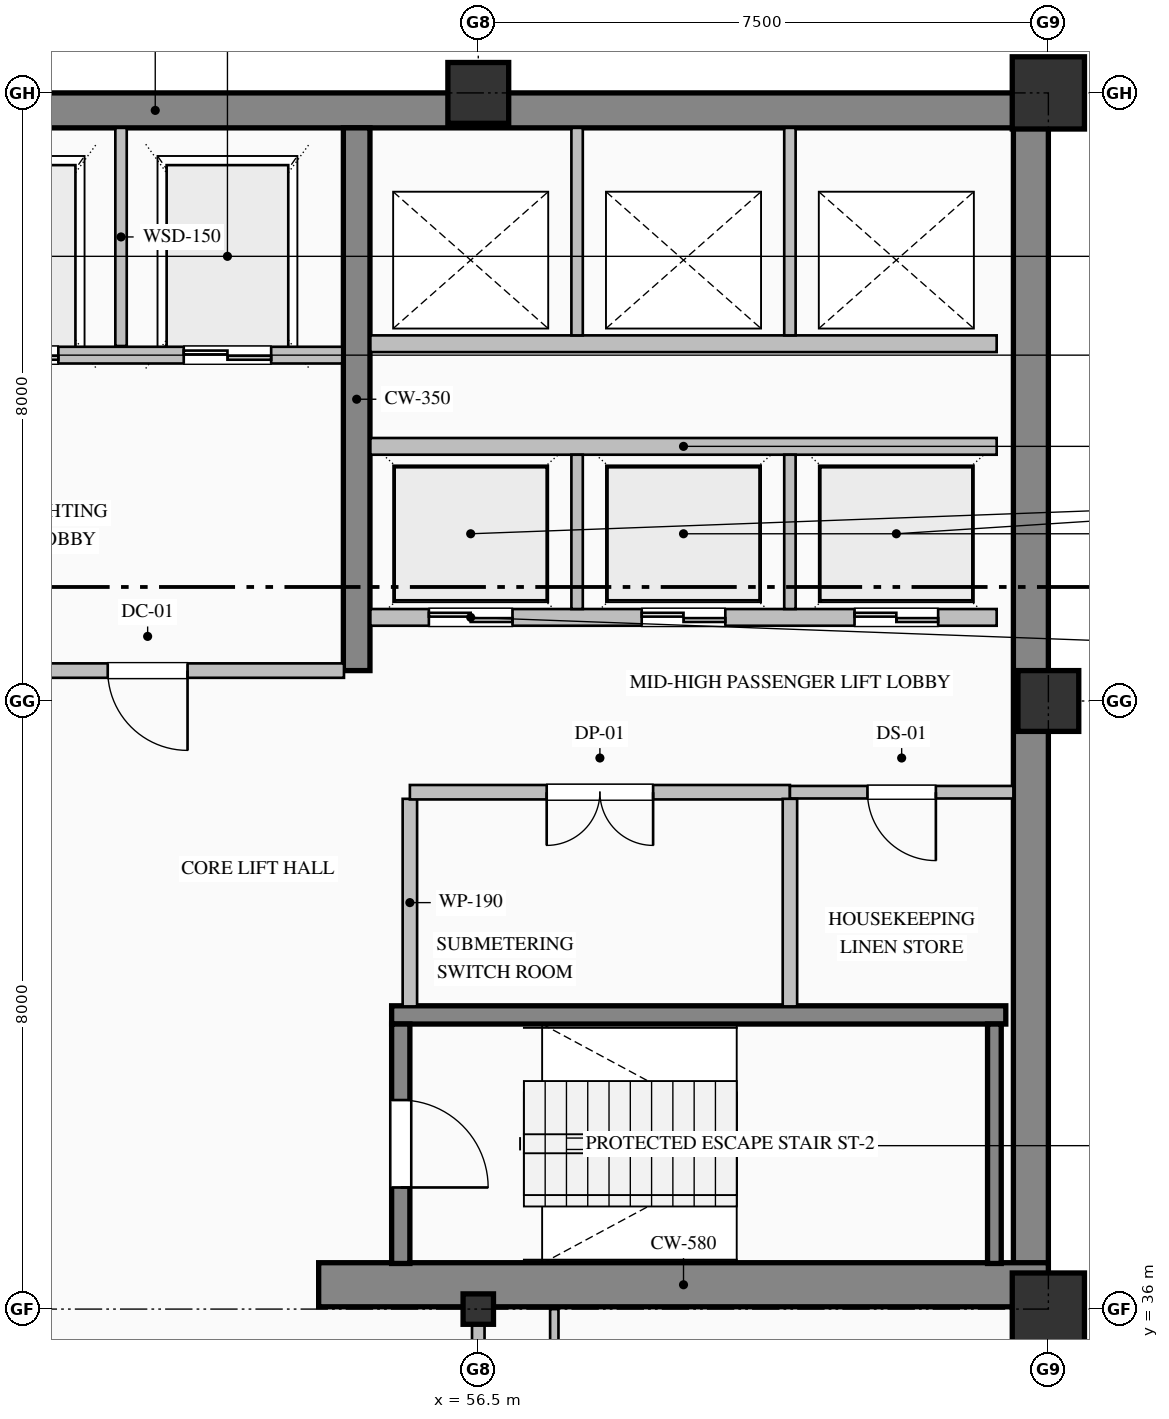
"""IFC4 building model, lengths in metres.
Left out: names, types, materials, properties, quantities, classifications, styles, units other than length and angle.
Written with IfcOpenShell. Run it as: python <this file> out.ifc"""

import sys

from ifc_helpers import new_model, si_unit, direction, frame, frame_2d, origin, origin_2d, place, context, subcontext, project, spatial, rectangle, hollow_rectangle, i_section, extrude, element, fill, save


model = new_model("IFC4")
c1 = context("Model", 3, precision=1e-05, world=origin(), true_north=direction((0.0, 1.0)))
c2 = subcontext(c1, "Body", "Model", "MODEL_VIEW")
j1 = project(units=[si_unit("LENGTHUNIT", "METRE"), si_unit("PLANEANGLEUNIT", "RADIAN")], contexts=[c1])
p1 = place(None, origin())
s1 = spatial("IfcSite", under=j1, at=p1, CompositionType="ELEMENT")
p2 = place(p1, origin())
s2 = spatial("IfcBuilding", under=s1, at=p2, CompositionType="ELEMENT")
p3 = place(p2, frame((0.0, 0.0, 245.8)))
s3 = spatial("IfcBuildingStorey", under=s2, at=p3, CompositionType="ELEMENT", Elevation=245.8)
p4 = place(p3, frame((40.5, 51.77, 0.0), z_axis=(0.0, 0.0, 1.0), x_axis=(1.0, 0.0, 0.0)))
e1 = element("IfcWall", 1, at=p4, inside=s3, PredefinedType="SHEAR", context=c2, shape_type="SweptSolid", body=[
    extrude(rectangle(XDim=23.5, YDim=0.46, at=frame_2d((11.75, 0.0))), origin(), (0.0, 0.0, 1.0), 3.775),
])
p5 = place(p3, frame((63.77, 36.32, 0.0), z_axis=(0.0, 0.0, 1.0), x_axis=(0.0, 1.0, 0.0)))
e2 = element("IfcWall", 2, at=p5, inside=s3, PredefinedType="SHEAR", context=c2, shape_type="SweptSolid", body=[
    extrude(rectangle(XDim=15.22, YDim=0.46, at=frame_2d((7.61, 0.0))), origin(), (0.0, 0.0, 1.0), 3.775),
])
p6 = place(p3, frame((54.4, 36.32, 0.0), z_axis=(0.0, 0.0, 1.0), x_axis=(1.0, 0.0, 0.0)))
e3 = element("IfcWall", 3, at=p6, inside=s3, PredefinedType="SHEAR", context=c2, shape_type="SweptSolid", body=[
    extrude(rectangle(XDim=9.6, YDim=0.58, at=frame_2d((4.8, 0.0))), origin(), (0.0, 0.0, 1.0), 4.0),
])
p7 = place(p3, frame((54.9, 44.4, 0.0), z_axis=(0.0, 0.0, 1.0), x_axis=(0.0, 1.0, 0.0)))
e4 = element("IfcWall", 4, at=p7, inside=s3, PredefinedType="SHEAR", context=c2, shape_type="SweptSolid", body=[
    extrude(rectangle(XDim=7.14, YDim=0.35, at=frame_2d((3.57, 0.0))), origin(), (0.0, 0.0, 1.0), 3.775),
])
p8 = place(p3, frame((56.5, 36.0, 0.0), z_axis=(0.0, 0.0, 1.0), x_axis=(1.0, 0.0, 0.0)))
e5 = element("IfcColumn", 5, at=p8, inside=s3, PredefinedType="COLUMN", context=c2, shape_type="SweptSolid", body=[
    extrude(i_section(OverallWidth=0.4, OverallDepth=0.4, WebThickness=0.013, FlangeThickness=0.021, FilletRadius=0.022, at=origin_2d()), origin(), (0.0, 0.0, 1.0), 4.0),
])
p9 = place(p3, frame((56.5, 52.0, 0.0), z_axis=(0.0, 0.0, 1.0), x_axis=(1.0, 0.0, 0.0)))
e6 = element("IfcColumn", 6, at=p9, inside=s3, PredefinedType="COLUMN", context=c2, shape_type="SweptSolid", body=[
    extrude(hollow_rectangle(XDim=0.8, YDim=0.8, WallThickness=0.032, at=origin_2d()), origin(), (0.0, 0.0, 1.0), 4.0),
])
p10 = place(p3, frame((64.0, 36.0, 0.0), z_axis=(0.0, 0.0, 1.0), x_axis=(1.0, 0.0, 0.0)))
e7 = element("IfcColumn", 7, at=p10, inside=s3, PredefinedType="COLUMN", context=c2, shape_type="SweptSolid", body=[
    extrude(hollow_rectangle(XDim=0.95, YDim=0.95, WallThickness=0.036, at=origin_2d()), origin(), (0.0, 0.0, 1.0), 4.0),
])
p11 = place(p3, frame((64.0, 44.0, 0.0), z_axis=(0.0, 0.0, 1.0), x_axis=(1.0, 0.0, 0.0)))
e8 = element("IfcColumn", 8, at=p11, inside=s3, PredefinedType="COLUMN", context=c2, shape_type="SweptSolid", body=[
    extrude(hollow_rectangle(XDim=0.8, YDim=0.8, WallThickness=0.032, at=origin_2d()), origin(), (0.0, 0.0, 1.0), 4.0),
])
p12 = place(p3, frame((64.0, 52.0, 0.0), z_axis=(0.0, 0.0, 1.0), x_axis=(1.0, 0.0, 0.0)))
e9 = element("IfcColumn", 9, at=p12, inside=s3, PredefinedType="COLUMN", context=c2, shape_type="SweptSolid", body=[
    extrude(hollow_rectangle(XDim=0.95, YDim=0.95, WallThickness=0.036, at=origin_2d()), origin(), (0.0, 0.0, 1.0), 4.0),
])
p13 = place(p3, frame((63.82, 36.05, 0.0), z_axis=(0.0, 0.0, 1.0), x_axis=(0.0, -1.0, 0.0)))
e10 = element("IfcWall", 10, at=p13, inside=s3, PredefinedType="SOLIDWALL", context=c2, shape_type="SweptSolid", body=[
    extrude(rectangle(XDim=19.55, YDim=0.36, at=frame_2d((9.775, 0.0))), origin(), (0.0, 0.0, 1.0), 3.325),
])
p14 = place(p13, frame((2.85, 0.0, 0.7)))
e11 = element("IfcOpeningElement", 11, at=p14, cuts=e10, PredefinedType="OPENING", context=c2, shape_type="SweptSolid", body=[
    extrude(rectangle(XDim=1.5, YDim=2.4, at=frame_2d((0.75, 1.2))), frame((0.0, 0.19, 0.0), z_axis=(0.0, -1.0, 0.0), x_axis=(1.0, 0.0, 0.0)), (0.0, 0.0, 1.0), 0.38),
])
p15 = place(p13, frame((10.125, 0.0, 0.9)))
e12 = element("IfcOpeningElement", 12, at=p15, cuts=e10, PredefinedType="OPENING", context=c2, shape_type="SweptSolid", body=[
    extrude(rectangle(XDim=1.35, YDim=1.85, at=frame_2d((0.675, 0.925))), frame((0.0, 0.19, 0.0), z_axis=(0.0, -1.0, 0.0), x_axis=(1.0, 0.0, 0.0)), (0.0, 0.0, 1.0), 0.38),
])
p16 = place(p13, frame((13.65, 0.0, 0.7)))
e13 = element("IfcOpeningElement", 13, at=p16, cuts=e10, PredefinedType="OPENING", context=c2, shape_type="SweptSolid", body=[
    extrude(rectangle(XDim=1.5, YDim=2.4, at=frame_2d((0.75, 1.2))), frame((0.0, 0.19, 0.0), z_axis=(0.0, -1.0, 0.0), x_axis=(1.0, 0.0, 0.0)), (0.0, 0.0, 1.0), 0.38),
])
p17 = place(p3, frame((55.36, 39.87, 0.0), z_axis=(0.0, 0.0, 1.0), x_axis=(1.0, 0.0, 0.0)))
e14 = element("IfcWall", 14, at=p17, inside=s3, PredefinedType="SOLIDWALL", context=c2, shape_type="SweptSolid", body=[
    extrude(rectangle(XDim=8.08, YDim=0.24, at=frame_2d((4.04, 0.0))), origin(), (0.0, 0.0, 1.0), 4.0),
])
p18 = place(p3, frame((55.48, 39.75, 0.0), z_axis=(0.0, 0.0, 1.0), x_axis=(0.0, -1.0, 0.0)))
e15 = element("IfcWall", 15, at=p18, inside=s3, PredefinedType="SOLIDWALL", context=c2, shape_type="SweptSolid", body=[
    extrude(rectangle(XDim=3.15, YDim=0.24, at=frame_2d((1.575, 0.0))), origin(), (0.0, 0.0, 1.0), 4.0),
])
p19 = place(p18, frame((1.0, 0.0, 0.0)))
e16 = element("IfcOpeningElement", 16, at=p19, cuts=e15, PredefinedType="OPENING", context=c2, shape_type="SweptSolid", body=[
    extrude(rectangle(XDim=1.15, YDim=2.2, at=frame_2d((0.575, 1.1))), frame((0.0, 0.13, 0.0), z_axis=(0.0, -1.0, 0.0), x_axis=(1.0, 0.0, 0.0)), (0.0, 0.0, 1.0), 0.26),
])
p20 = place(p3, frame((63.29, 36.6, 0.0), z_axis=(0.0, 0.0, 1.0), x_axis=(0.0, 1.0, 0.0)))
e17 = element("IfcWall", 17, at=p20, inside=s3, PredefinedType="SOLIDWALL", context=c2, shape_type="SweptSolid", body=[
    extrude(rectangle(XDim=3.15, YDim=0.18, at=frame_2d((1.575, 0.0))), origin(), (0.0, 0.0, 1.0), 4.0),
])
p21 = place(p3, frame((54.71, 48.55, 0.0), z_axis=(0.0, 0.0, 1.0), x_axis=(-1.0, 0.0, 0.0)))
e18 = element("IfcWall", 18, at=p21, inside=s3, PredefinedType="PARTITIONING", context=c2, shape_type="SweptSolid", body=[
    extrude(rectangle(XDim=5.12, YDim=0.22, at=frame_2d((2.56, 0.0))), origin(), (0.0, 0.0, 1.0), 3.775),
])
p22 = place(p21, frame((3.735, 0.0, 0.0)))
e19 = element("IfcOpeningElement", 19, at=p22, cuts=e18, PredefinedType="OPENING", context=c2, shape_type="SweptSolid", body=[
    extrude(rectangle(XDim=1.15, YDim=2.2, at=frame_2d((0.575, 1.1))), frame((0.0, 0.12, 0.0), z_axis=(0.0, -1.0, 0.0), x_axis=(1.0, 0.0, 0.0)), (0.0, 0.0, 1.0), 0.24),
])
p23 = place(p21, frame((0.935, 0.0, 0.0)))
e20 = element("IfcOpeningElement", 20, at=p23, cuts=e18, PredefinedType="OPENING", context=c2, shape_type="SweptSolid", body=[
    extrude(rectangle(XDim=1.15, YDim=2.2, at=frame_2d((0.575, 1.1))), frame((0.0, 0.12, 0.0), z_axis=(0.0, -1.0, 0.0), x_axis=(1.0, 0.0, 0.0)), (0.0, 0.0, 1.0), 0.24),
])
p24 = place(p3, frame((51.8, 48.67, 0.0), z_axis=(0.0, 0.0, 1.0), x_axis=(0.0, 1.0, 0.0)))
e21 = element("IfcWall", 21, at=p24, inside=s3, PredefinedType="PARTITIONING", context=c2, shape_type="SweptSolid", body=[
    extrude(rectangle(XDim=2.87, YDim=0.15, at=frame_2d((1.435, 0.0))), origin(), (0.0, 0.0, 1.0), 3.775),
])
p25 = place(p3, frame((63.32, 45.1, 0.0), z_axis=(0.0, 0.0, 1.0), x_axis=(-1.0, 0.0, 0.0)))
e22 = element("IfcWall", 22, at=p25, inside=s3, PredefinedType="PARTITIONING", context=c2, shape_type="SweptSolid", body=[
    extrude(rectangle(XDim=8.24, YDim=0.22, at=frame_2d((4.12, 0.0))), origin(), (0.0, 0.0, 1.0), 3.775),
])
p26 = place(p25, frame((6.37, 0.0, 0.0)))
e23 = element("IfcOpeningElement", 23, at=p26, cuts=e22, PredefinedType="OPENING", context=c2, shape_type="SweptSolid", body=[
    extrude(rectangle(XDim=1.1, YDim=2.2, at=frame_2d((0.55, 1.1))), frame((0.0, 0.12, 0.0), z_axis=(0.0, -1.0, 0.0), x_axis=(1.0, 0.0, 0.0)), (0.0, 0.0, 1.0), 0.24),
])
p27 = place(p25, frame((3.57, 0.0, 0.0)))
e24 = element("IfcOpeningElement", 24, at=p27, cuts=e22, PredefinedType="OPENING", context=c2, shape_type="SweptSolid", body=[
    extrude(rectangle(XDim=1.1, YDim=2.2, at=frame_2d((0.55, 1.1))), frame((0.0, 0.12, 0.0), z_axis=(0.0, -1.0, 0.0), x_axis=(1.0, 0.0, 0.0)), (0.0, 0.0, 1.0), 0.24),
])
p28 = place(p25, frame((0.77, 0.0, 0.0)))
e25 = element("IfcOpeningElement", 25, at=p28, cuts=e22, PredefinedType="OPENING", context=c2, shape_type="SweptSolid", body=[
    extrude(rectangle(XDim=1.1, YDim=2.2, at=frame_2d((0.55, 1.1))), frame((0.0, 0.12, 0.0), z_axis=(0.0, -1.0, 0.0), x_axis=(1.0, 0.0, 0.0)), (0.0, 0.0, 1.0), 0.24),
])
p29 = place(p3, frame((55.08, 47.35, 0.0), z_axis=(0.0, 0.0, 1.0), x_axis=(1.0, 0.0, 0.0)))
e26 = element("IfcWall", 26, at=p29, inside=s3, PredefinedType="PARTITIONING", context=c2, shape_type="SweptSolid", body=[
    extrude(rectangle(XDim=8.24, YDim=0.22, at=frame_2d((4.12, 0.0))), origin(), (0.0, 0.0, 1.0), 3.775),
])
for number, where, z_axis, x_axis in (
    (27, (57.8, 45.21, 0.0), (0.0, 0.0, 1.0), (0.0, 1.0, 0.0)),
    (28, (60.6, 45.21, 0.0), (0.0, 0.0, 1.0), (0.0, 1.0, 0.0)),
):
    element("IfcWall", number, at=place(p3, frame(where, z_axis=z_axis, x_axis=x_axis)), inside=s3, PredefinedType="PARTITIONING", context=c2, shape_type="SweptSolid", body=[
        extrude(rectangle(XDim=2.03, YDim=0.15, at=frame_2d((1.015, 0.0))), origin(), (0.0, 0.0, 1.0), 3.775),
    ])
p30 = place(p3, frame((63.32, 48.7, 0.0), z_axis=(0.0, 0.0, 1.0), x_axis=(-1.0, 0.0, 0.0)))
e29 = element("IfcWall", 29, at=p30, inside=s3, PredefinedType="PARTITIONING", context=c2, shape_type="SweptSolid", body=[
    extrude(rectangle(XDim=8.24, YDim=0.22, at=frame_2d((4.12, 0.0))), origin(), (0.0, 0.0, 1.0), 3.775),
])
for number, where, z_axis, x_axis in (
    (30, (57.8, 48.81, 0.0), (0.0, 0.0, 1.0), (0.0, 1.0, 0.0)),
    (31, (60.6, 48.81, 0.0), (0.0, 0.0, 1.0), (0.0, 1.0, 0.0)),
):
    element("IfcWall", number, at=place(p3, frame(where, z_axis=z_axis, x_axis=x_axis)), inside=s3, PredefinedType="PARTITIONING", context=c2, shape_type="SweptSolid", body=[
        extrude(rectangle(XDim=2.73, YDim=0.15, at=frame_2d((1.365, 0.0))), origin(), (0.0, 0.0, 1.0), 3.775),
    ])
p31 = place(p3, frame((54.733, 44.4, 0.0), z_axis=(0.0, 0.0, 1.0), x_axis=(-1.0, 0.0, 0.0)))
e32 = element("IfcWall", 32, at=p31, inside=s3, PredefinedType="PARTITIONING", context=c2, shape_type="SweptSolid", body=[
    extrude(rectangle(XDim=5.166, YDim=0.19, at=frame_2d((2.583, 0.0))), origin(), (0.0, 0.0, 1.0), 3.775),
])
p32 = place(p31, frame((2.058, 0.0, 0.0)))
e33 = element("IfcOpeningElement", 33, at=p32, cuts=e32, PredefinedType="OPENING", context=c2, shape_type="SweptSolid", body=[
    extrude(rectangle(XDim=1.05, YDim=2.15, at=frame_2d((0.525, 1.075))), frame((0.0, 0.105, 0.0), z_axis=(0.0, -1.0, 0.0), x_axis=(1.0, 0.0, 0.0)), (0.0, 0.0, 1.0), 0.21),
])
p33 = place(p3, frame((55.6, 42.713, 0.0), z_axis=(0.0, 0.0, 1.0), x_axis=(0.0, -1.0, 0.0)))
e34 = element("IfcWall", 34, at=p33, inside=s3, PredefinedType="PARTITIONING", context=c2, shape_type="SweptSolid", body=[
    extrude(rectangle(XDim=2.731, YDim=0.19, at=frame_2d((1.365, 0.0))), origin(), (0.0, 0.0, 1.0), 3.775),
])
p34 = place(p3, frame((60.6, 42.8, 0.0), z_axis=(0.0, 0.0, 1.0), x_axis=(-1.0, 0.0, 0.0)))
e35 = element("IfcWall", 35, at=p34, inside=s3, PredefinedType="PARTITIONING", context=c2, shape_type="SweptSolid", body=[
    extrude(rectangle(XDim=5.0, YDim=0.19, at=frame_2d((2.5, 0.0))), origin(), (0.0, 0.0, 1.0), 3.775),
])
p35 = place(p34, frame((1.8, 0.0, 0.0)))
e36 = element("IfcOpeningElement", 36, at=p35, cuts=e35, PredefinedType="OPENING", context=c2, shape_type="SweptSolid", body=[
    extrude(rectangle(XDim=1.4, YDim=2.25, at=frame_2d((0.7, 1.125))), frame((0.0, 0.105, 0.0), z_axis=(0.0, -1.0, 0.0), x_axis=(1.0, 0.0, 0.0)), (0.0, 0.0, 1.0), 0.21),
])
p36 = place(p3, frame((63.54, 42.8, 0.0), z_axis=(0.0, 0.0, 1.0), x_axis=(-1.0, 0.0, 0.0)))
e37 = element("IfcWall", 37, at=p36, inside=s3, PredefinedType="PARTITIONING", context=c2, shape_type="SweptSolid", body=[
    extrude(rectangle(XDim=2.94, YDim=0.165, at=frame_2d((1.47, 0.0))), origin(), (0.0, 0.0, 1.0), 3.775),
])
p37 = place(p36, frame((1.02, 0.0, 0.0)))
e38 = element("IfcOpeningElement", 38, at=p37, cuts=e37, PredefinedType="OPENING", context=c2, shape_type="SweptSolid", body=[
    extrude(rectangle(XDim=0.9, YDim=2.15, at=frame_2d((0.45, 1.075))), frame((0.0, 0.093, 0.0), z_axis=(0.0, -1.0, 0.0), x_axis=(1.0, 0.0, 0.0)), (0.0, 0.0, 1.0), 0.185),
])
p38 = place(p3, frame((60.6, 42.713, 0.0), z_axis=(0.0, 0.0, 1.0), x_axis=(0.0, -1.0, 0.0)))
e39 = element("IfcWall", 39, at=p38, inside=s3, PredefinedType="PARTITIONING", context=c2, shape_type="SweptSolid", body=[
    extrude(rectangle(XDim=2.731, YDim=0.19, at=frame_2d((1.365, 0.0))), origin(), (0.0, 0.0, 1.0), 3.775),
])
p39 = place(p3, frame((56.5, 36.0, 0.0), z_axis=(0.0, 0.0, 1.0), x_axis=(0.0, -1.0, 0.0)))
e40 = element("IfcWall", 40, at=p39, inside=s3, PredefinedType="PARTITIONING", context=c2, shape_type="SweptSolid", body=[
    extrude(rectangle(XDim=5.525, YDim=0.165, at=frame_2d((2.763, 0.0))), origin(), (0.0, 0.0, 1.0), 3.179),
])
p40 = place(p3, frame((57.5, 36.0, 0.0), z_axis=(0.0, 0.0, 1.0), x_axis=(0.0, -1.0, 0.0)))
e41 = element("IfcWall", 41, at=p40, inside=s3, PredefinedType="MOVABLE", context=c2, shape_type="SweptSolid", body=[
    extrude(rectangle(XDim=12.525, YDim=0.11, at=frame_2d((6.263, 0.0))), origin(), (0.0, 0.0, 1.0), 3.775),
])
p41 = place(p40, frame((5.763, 0.0, 0.0)))
e42 = element("IfcOpeningElement", 42, at=p41, cuts=e41, PredefinedType="OPENING", context=c2, shape_type="SweptSolid", body=[
    extrude(rectangle(XDim=1.0, YDim=2.15, at=frame_2d((0.5, 1.075))), frame((0.0, 0.065, 0.0), z_axis=(0.0, -1.0, 0.0), x_axis=(1.0, 0.0, 0.0)), (0.0, 0.0, 1.0), 0.13),
])
p42 = place(p19, origin())
e43 = element("IfcDoor", 43, at=p42, inside=s3, OperationType="SINGLE_SWING_RIGHT", PredefinedType="DOOR", context=c2, shape_type="SweptSolid", body=[
    extrude(rectangle(XDim=1.15, YDim=2.2, at=frame_2d((0.575, 1.1))), frame((0.0, 0.025, 0.0), z_axis=(0.0, -1.0, 0.0), x_axis=(1.0, 0.0, 0.0)), (0.0, 0.0, 1.0), 0.05),
])
fill(e16, e43)
p43 = place(p22, origin())
e44 = element("IfcDoor", 44, at=p43, inside=s3, OperationType="DOUBLE_DOOR_SLIDING", PredefinedType="DOOR", context=c2, shape_type="SweptSolid", body=[
    extrude(rectangle(XDim=1.15, YDim=2.2, at=frame_2d((0.575, 1.1))), frame((0.0, 0.025, 0.0), z_axis=(0.0, -1.0, 0.0), x_axis=(1.0, 0.0, 0.0)), (0.0, 0.0, 1.0), 0.05),
])
fill(e19, e44)
p44 = place(p23, origin())
e45 = element("IfcDoor", 45, at=p44, inside=s3, OperationType="DOUBLE_DOOR_SLIDING", PredefinedType="DOOR", context=c2, shape_type="SweptSolid", body=[
    extrude(rectangle(XDim=1.15, YDim=2.2, at=frame_2d((0.575, 1.1))), frame((0.0, 0.025, 0.0), z_axis=(0.0, -1.0, 0.0), x_axis=(1.0, 0.0, 0.0)), (0.0, 0.0, 1.0), 0.05),
])
fill(e20, e45)
p45 = place(p26, origin())
e46 = element("IfcDoor", 46, at=p45, inside=s3, OperationType="DOUBLE_DOOR_SLIDING", PredefinedType="DOOR", context=c2, shape_type="SweptSolid", body=[
    extrude(rectangle(XDim=1.1, YDim=2.2, at=frame_2d((0.55, 1.1))), frame((0.0, 0.025, 0.0), z_axis=(0.0, -1.0, 0.0), x_axis=(1.0, 0.0, 0.0)), (0.0, 0.0, 1.0), 0.05),
])
fill(e23, e46)
p46 = place(p27, origin())
e47 = element("IfcDoor", 47, at=p46, inside=s3, OperationType="DOUBLE_DOOR_SLIDING", PredefinedType="DOOR", context=c2, shape_type="SweptSolid", body=[
    extrude(rectangle(XDim=1.1, YDim=2.2, at=frame_2d((0.55, 1.1))), frame((0.0, 0.025, 0.0), z_axis=(0.0, -1.0, 0.0), x_axis=(1.0, 0.0, 0.0)), (0.0, 0.0, 1.0), 0.05),
])
fill(e24, e47)
p47 = place(p28, origin())
e48 = element("IfcDoor", 48, at=p47, inside=s3, OperationType="DOUBLE_DOOR_SLIDING", PredefinedType="DOOR", context=c2, shape_type="SweptSolid", body=[
    extrude(rectangle(XDim=1.1, YDim=2.2, at=frame_2d((0.55, 1.1))), frame((0.0, 0.025, 0.0), z_axis=(0.0, -1.0, 0.0), x_axis=(1.0, 0.0, 0.0)), (0.0, 0.0, 1.0), 0.05),
])
fill(e25, e48)
p48 = place(p32, origin())
e49 = element("IfcDoor", 49, at=p48, inside=s3, OperationType="SINGLE_SWING_LEFT", PredefinedType="DOOR", context=c2, shape_type="SweptSolid", body=[
    extrude(rectangle(XDim=1.05, YDim=2.15, at=frame_2d((0.525, 1.075))), frame((0.0, 0.025, 0.0), z_axis=(0.0, -1.0, 0.0), x_axis=(1.0, 0.0, 0.0)), (0.0, 0.0, 1.0), 0.05),
])
fill(e33, e49)
p49 = place(p35, origin())
e50 = element("IfcDoor", 50, at=p49, inside=s3, OperationType="DOUBLE_DOOR_SINGLE_SWING", PredefinedType="DOOR", context=c2, shape_type="SweptSolid", body=[
    extrude(rectangle(XDim=1.4, YDim=2.25, at=frame_2d((0.7, 1.125))), frame((0.0, 0.025, 0.0), z_axis=(0.0, -1.0, 0.0), x_axis=(1.0, 0.0, 0.0)), (0.0, 0.0, 1.0), 0.05),
])
fill(e36, e50)
p50 = place(p37, origin())
e51 = element("IfcDoor", 51, at=p50, inside=s3, OperationType="SINGLE_SWING_LEFT", PredefinedType="DOOR", context=c2, shape_type="SweptSolid", body=[
    extrude(rectangle(XDim=0.9, YDim=2.15, at=frame_2d((0.45, 1.075))), frame((0.0, 0.025, 0.0), z_axis=(0.0, -1.0, 0.0), x_axis=(1.0, 0.0, 0.0)), (0.0, 0.0, 1.0), 0.05),
])
fill(e38, e51)
save(model, sys.argv[1])
